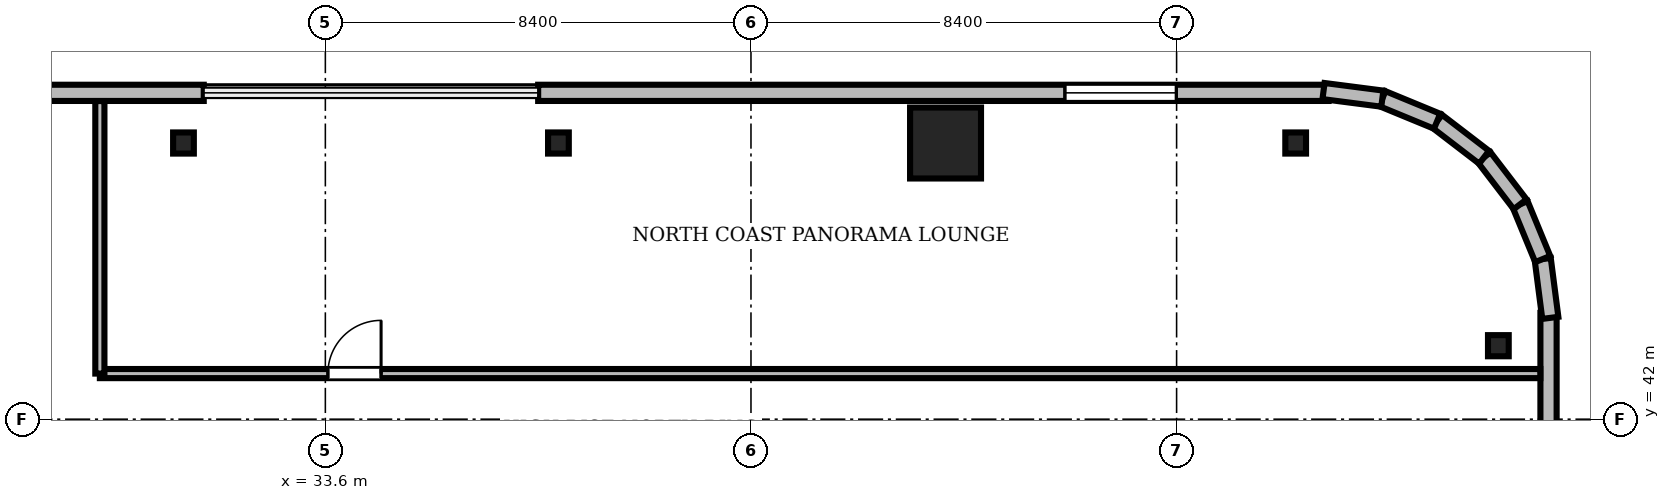
"""IFC4 building model, lengths in metres.
Left out: names, types, materials, properties, quantities, classifications, styles, units other than length and angle.
Written with IfcOpenShell. Run it as: python <this file> out.ifc"""

import sys

from ifc_helpers import new_model, si_unit, direction, frame, frame_2d, origin, origin_2d, place, context, subcontext, project, spatial, rectangle, i_section, extrude, source, transform, mapped, element, fill, save


model = new_model("IFC4")
c1 = context("Model", 3, precision=1e-05, world=origin(), true_north=direction((0.0, 1.0)))
c2 = subcontext(c1, "Body", "Model", "MODEL_VIEW")
j1 = project(units=[si_unit("LENGTHUNIT", "METRE"), si_unit("PLANEANGLEUNIT", "RADIAN")], contexts=[c1])
p1 = place(None, origin())
s1 = spatial("IfcSite", under=j1, at=p1, CompositionType="ELEMENT")
p2 = place(p1, origin())
s2 = spatial("IfcBuilding", under=s1, at=p2, CompositionType="ELEMENT")
p3 = place(p2, frame((0.0, 0.0, 192.3)))
s3 = spatial("IfcBuildingStorey", under=s2, at=p3, CompositionType="ELEMENT", Elevation=192.3)
m1 = source(origin(), c2, "Body", "SweptSolid", [
    extrude(rectangle(XDim=1.4, YDim=1.4, at=origin_2d()), origin(), (0.0, 0.0, 1.0), 3.53),
])
p4 = place(p3, frame((45.84, 47.45, 0.0), z_axis=(0.0, 0.0, 1.0), x_axis=(1.0, 0.0, 0.0)))
e1 = element("IfcColumn", 1, at=p4, inside=s3, PredefinedType="COLUMN", context=c2, shape_type="MappedRepresentation", body=[
    mapped(m1, transform((0.0, 0.0, 0.0), scale=1.0)),
])
m2 = source(origin(), c2, "Body", "SweptSolid", [
    extrude(i_section(OverallWidth=0.409, OverallDepth=0.417, WebThickness=0.021, FlangeThickness=0.033, FilletRadius=0.015, at=origin_2d()), origin(), (0.0, 0.0, 1.0), 3.53),
])
for number, where, z_axis, x_axis in (
    (2, (56.75, 43.45, 0.0), (0.0, 0.0, 1.0), (1.0, 0.0, 0.0)),
    (3, (52.75, 47.45, 0.0), (0.0, 0.0, 1.0), (1.0, 0.0, 0.0)),
    (4, (38.2, 47.45, 0.0), (0.0, 0.0, 1.0), (1.0, 0.0, 0.0)),
    (5, (30.8, 47.45, 0.0), (0.0, 0.0, 1.0), (1.0, 0.0, 0.0)),
):
    element("IfcColumn", number, at=place(p3, frame(where, z_axis=z_axis, x_axis=x_axis)), inside=s3, PredefinedType="COLUMN", context=c2, shape_type="MappedRepresentation", body=[
        mapped(m2, transform((0.0, 0.0, 0.0), scale=1.0)),
    ])
m3 = source(origin(), c2, "Body", "SweptSolid", [
    extrude(rectangle(XDim=15.6, YDim=0.32, at=frame_2d((7.8, 0.0))), origin(), (0.0, 0.0, 1.0), 3.53),
])
p5 = place(p3, frame((53.4, 48.44, 0.0), z_axis=(0.0, 0.0, 1.0), x_axis=(-1.0, 0.0, 0.0)))
e6 = element("IfcWall", 6, at=p5, inside=s3, PredefinedType="SOLIDWALL", context=c2, shape_type="MappedRepresentation", body=[
    mapped(m3, transform((0.0, 0.0, 0.0), scale=1.0)),
])
m4 = source(origin(), c2, "Body", "SweptSolid", [
    extrude(rectangle(XDim=2.2, YDim=2.4, at=frame_2d((1.1, 1.2))), frame((0.0, 0.17, 0.0), z_axis=(0.0, -1.0, 0.0), x_axis=(1.0, 0.0, 0.0)), (0.0, 0.0, 1.0), 0.34),
])
p6 = place(p5, frame((3.005, 0.0, 0.72)))
e7 = element("IfcOpeningElement", 7, at=p6, cuts=e6, PredefinedType="OPENING", context=c2, shape_type="MappedRepresentation", body=[
    mapped(m4, transform((0.0, 0.0, 0.0), scale=1.0)),
])
p7 = place(p3, frame((31.2, 48.44, 0.0), z_axis=(0.0, 0.0, 1.0), x_axis=(-1.0, 0.0, 0.0)))
e8 = element("IfcWall", 8, at=p7, inside=s3, PredefinedType="SOLIDWALL", context=c2, shape_type="MappedRepresentation", body=[
    mapped(m3, transform((0.0, 0.0, 0.0), scale=1.0)),
])
m5 = source(origin(), c2, "Body", "SweptSolid", [
    extrude(rectangle(XDim=1.4, YDim=2.3, at=frame_2d((0.7, 1.15))), frame((0.0, 0.17, 0.0), z_axis=(0.0, -1.0, 0.0), x_axis=(1.0, 0.0, 0.0)), (0.0, 0.0, 1.0), 0.34),
])
p8 = place(p7, frame((4.59, 0.0, 0.0)))
e9 = element("IfcOpeningElement", 9, at=p8, cuts=e8, PredefinedType="OPENING", context=c2, shape_type="MappedRepresentation", body=[
    mapped(m5, transform((0.0, 0.0, 0.0), scale=1.0)),
])
p9 = place(p7, frame((10.395, 0.0, 0.72)))
e10 = element("IfcOpeningElement", 10, at=p9, cuts=e8, PredefinedType="OPENING", context=c2, shape_type="MappedRepresentation", body=[
    mapped(m4, transform((0.0, 0.0, 0.0), scale=1.0)),
])
m6 = source(origin(), c2, "Body", "SweptSolid", [
    extrude(rectangle(XDim=15.6, YDim=0.32, at=frame_2d((7.8, 0.0))), origin(), (0.0, 0.0, 1.0), 3.53),
])
p10 = place(p3, frame((57.74, 28.5, 0.0), z_axis=(0.0, 0.0, 1.0), x_axis=(0.0, 1.0, 0.0)))
e11 = element("IfcWall", 11, at=p10, inside=s3, PredefinedType="SOLIDWALL", context=c2, shape_type="MappedRepresentation", body=[
    mapped(m6, transform((0.0, 0.0, 0.0), scale=1.0)),
])
p11 = place(p10, frame((10.395, 0.0, 0.72)))
e12 = element("IfcOpeningElement", 12, at=p11, cuts=e11, PredefinedType="OPENING", context=c2, shape_type="MappedRepresentation", body=[
    mapped(m4, transform((0.0, 0.0, 0.0), scale=1.0)),
])
m7 = source(origin(), c2, "Body", "SweptSolid", [
    extrude(rectangle(XDim=1.17, YDim=0.32, at=frame_2d((0.585, 0.0))), origin(), (0.0, 0.0, 1.0), 3.53),
])
p12 = place(p3, frame((57.776, 44.0, 0.0), z_axis=(0.0, 0.0, 1.0), x_axis=(-0.128295670475, 0.991735963317, 0.0)))
e13 = element("IfcWall", 13, at=p12, inside=s3, PredefinedType="SOLIDWALL", context=c2, shape_type="MappedRepresentation", body=[
    mapped(m7, transform((0.0, 0.0, 0.0), scale=1.0)),
])
m8 = source(origin(), c2, "Body", "SweptSolid", [
    extrude(rectangle(XDim=1.169, YDim=0.32, at=frame_2d((0.584, 0.0))), origin(), (0.0, 0.0, 1.0), 3.53),
])
p13 = place(p3, frame((57.625, 45.16, 0.0), z_axis=(0.0, 0.0, 1.0), x_axis=(-0.381054331552, 0.924552646638, 0.0)))
e14 = element("IfcWall", 14, at=p13, inside=s3, PredefinedType="SOLIDWALL", context=c2, shape_type="MappedRepresentation", body=[
    mapped(m8, transform((0.0, 0.0, 0.0), scale=1.0)),
])
m9 = source(origin(), c2, "Body", "SweptSolid", [
    extrude(rectangle(XDim=1.169, YDim=0.32, at=frame_2d((0.584, 0.0))), origin(), (0.0, 0.0, 1.0), 3.53),
])
p14 = place(p3, frame((57.18, 46.241, 0.0), z_axis=(0.0, 0.0, 1.0), x_axis=(-0.608387696831, 0.793639975269, 0.0)))
e15 = element("IfcWall", 15, at=p14, inside=s3, PredefinedType="SOLIDWALL", context=c2, shape_type="MappedRepresentation", body=[
    mapped(m9, transform((0.0, 0.0, 0.0), scale=1.0)),
])
m10 = source(origin(), c2, "Body", "SweptSolid", [
    extrude(rectangle(XDim=1.169, YDim=0.32, at=frame_2d((0.584, 0.0))), origin(), (0.0, 0.0, 1.0), 3.53),
])
p15 = place(p3, frame((56.469, 47.169, 0.0), z_axis=(0.0, 0.0, 1.0), x_axis=(-0.793663520347, 0.608356981114, 0.0)))
e16 = element("IfcWall", 16, at=p15, inside=s3, PredefinedType="SOLIDWALL", context=c2, shape_type="MappedRepresentation", body=[
    mapped(m10, transform((0.0, 0.0, 0.0), scale=1.0)),
])
p16 = place(p3, frame((55.541, 47.88, 0.0), z_axis=(0.0, 0.0, 1.0), x_axis=(-0.924552646638, 0.381054331552, 0.0)))
e17 = element("IfcWall", 17, at=p16, inside=s3, PredefinedType="SOLIDWALL", context=c2, shape_type="MappedRepresentation", body=[
    mapped(m8, transform((0.0, 0.0, 0.0), scale=1.0)),
])
p17 = place(p3, frame((54.46, 48.325, 0.0), z_axis=(0.0, 0.0, 1.0), x_axis=(-0.991735963317, 0.128295670475, 0.0)))
e18 = element("IfcWall", 18, at=p17, inside=s3, PredefinedType="SOLIDWALL", context=c2, shape_type="MappedRepresentation", body=[
    mapped(m7, transform((0.0, 0.0, 0.0), scale=1.0)),
])
m11 = source(origin(), c2, "Body", "SweptSolid", [
    extrude(rectangle(XDim=28.428, YDim=0.18, at=frame_2d((14.214, 0.0))), origin(), (0.0, 0.0, 1.0), 2.772),
])
p18 = place(p3, frame((29.15, 42.9, 0.0), z_axis=(0.0, 0.0, 1.0), x_axis=(1.0, 0.0, 0.0)))
e19 = element("IfcWall", 19, at=p18, inside=s3, PredefinedType="PARTITIONING", context=c2, shape_type="MappedRepresentation", body=[
    mapped(m11, transform((0.0, 0.0, 0.0), scale=1.0)),
])
m12 = source(origin(), c2, "Body", "SweptSolid", [
    extrude(rectangle(XDim=1.05, YDim=2.2, at=frame_2d((0.525, 1.1))), frame((0.0, 0.1, 0.0), z_axis=(0.0, -1.0, 0.0), x_axis=(1.0, 0.0, 0.0)), (0.0, 0.0, 1.0), 0.2),
])
p19 = place(p18, frame((4.5, 0.0, 0.0)))
e20 = element("IfcOpeningElement", 20, at=p19, cuts=e19, PredefinedType="OPENING", context=c2, shape_type="MappedRepresentation", body=[
    mapped(m12, transform((0.0, 0.0, 0.0), scale=1.0)),
])
m13 = source(origin(), c2, "Body", "SweptSolid", [
    extrude(rectangle(XDim=5.378, YDim=0.18, at=frame_2d((2.689, 0.0))), origin(), (0.0, 0.0, 1.0), 2.772),
])
p20 = place(p3, frame((29.15, 42.9, 0.0), z_axis=(0.0, 0.0, 1.0), x_axis=(0.0, 1.0, 0.0)))
e21 = element("IfcWall", 21, at=p20, inside=s3, PredefinedType="PARTITIONING", context=c2, shape_type="MappedRepresentation", body=[
    mapped(m13, transform((0.0, 0.0, 0.0), scale=1.0)),
])
m14 = source(origin(), c2, "Body", "SweptSolid", [
    extrude(rectangle(XDim=2.2, YDim=2.4, at=frame_2d((1.1, 1.2))), frame((0.0, 0.03, 0.0), z_axis=(0.0, -1.0, 0.0), x_axis=(1.0, 0.0, 0.0)), (0.0, 0.0, 1.0), 0.06),
])
p21 = place(p6, origin())
e22 = element("IfcWindow", 22, at=p21, inside=s3, PartitioningType="SINGLE_PANEL", PredefinedType="WINDOW", context=c2, shape_type="MappedRepresentation", body=[
    mapped(m14, transform((0.0, 0.0, 0.0), scale=1.0)),
])
fill(e7, e22)
m15 = source(origin(), c2, "Body", "SweptSolid", [
    extrude(rectangle(XDim=1.05, YDim=2.2, at=frame_2d((0.525, 1.1))), frame((0.0, 0.025, 0.0), z_axis=(0.0, -1.0, 0.0), x_axis=(1.0, 0.0, 0.0)), (0.0, 0.0, 1.0), 0.05),
])
p22 = place(p19, origin())
e23 = element("IfcDoor", 23, at=p22, inside=s3, OperationType="SINGLE_SWING_RIGHT", PredefinedType="DOOR", context=c2, shape_type="MappedRepresentation", body=[
    mapped(m15, transform((0.0, 0.0, 0.0), scale=1.0)),
])
fill(e20, e23)
save(model, sys.argv[1])
